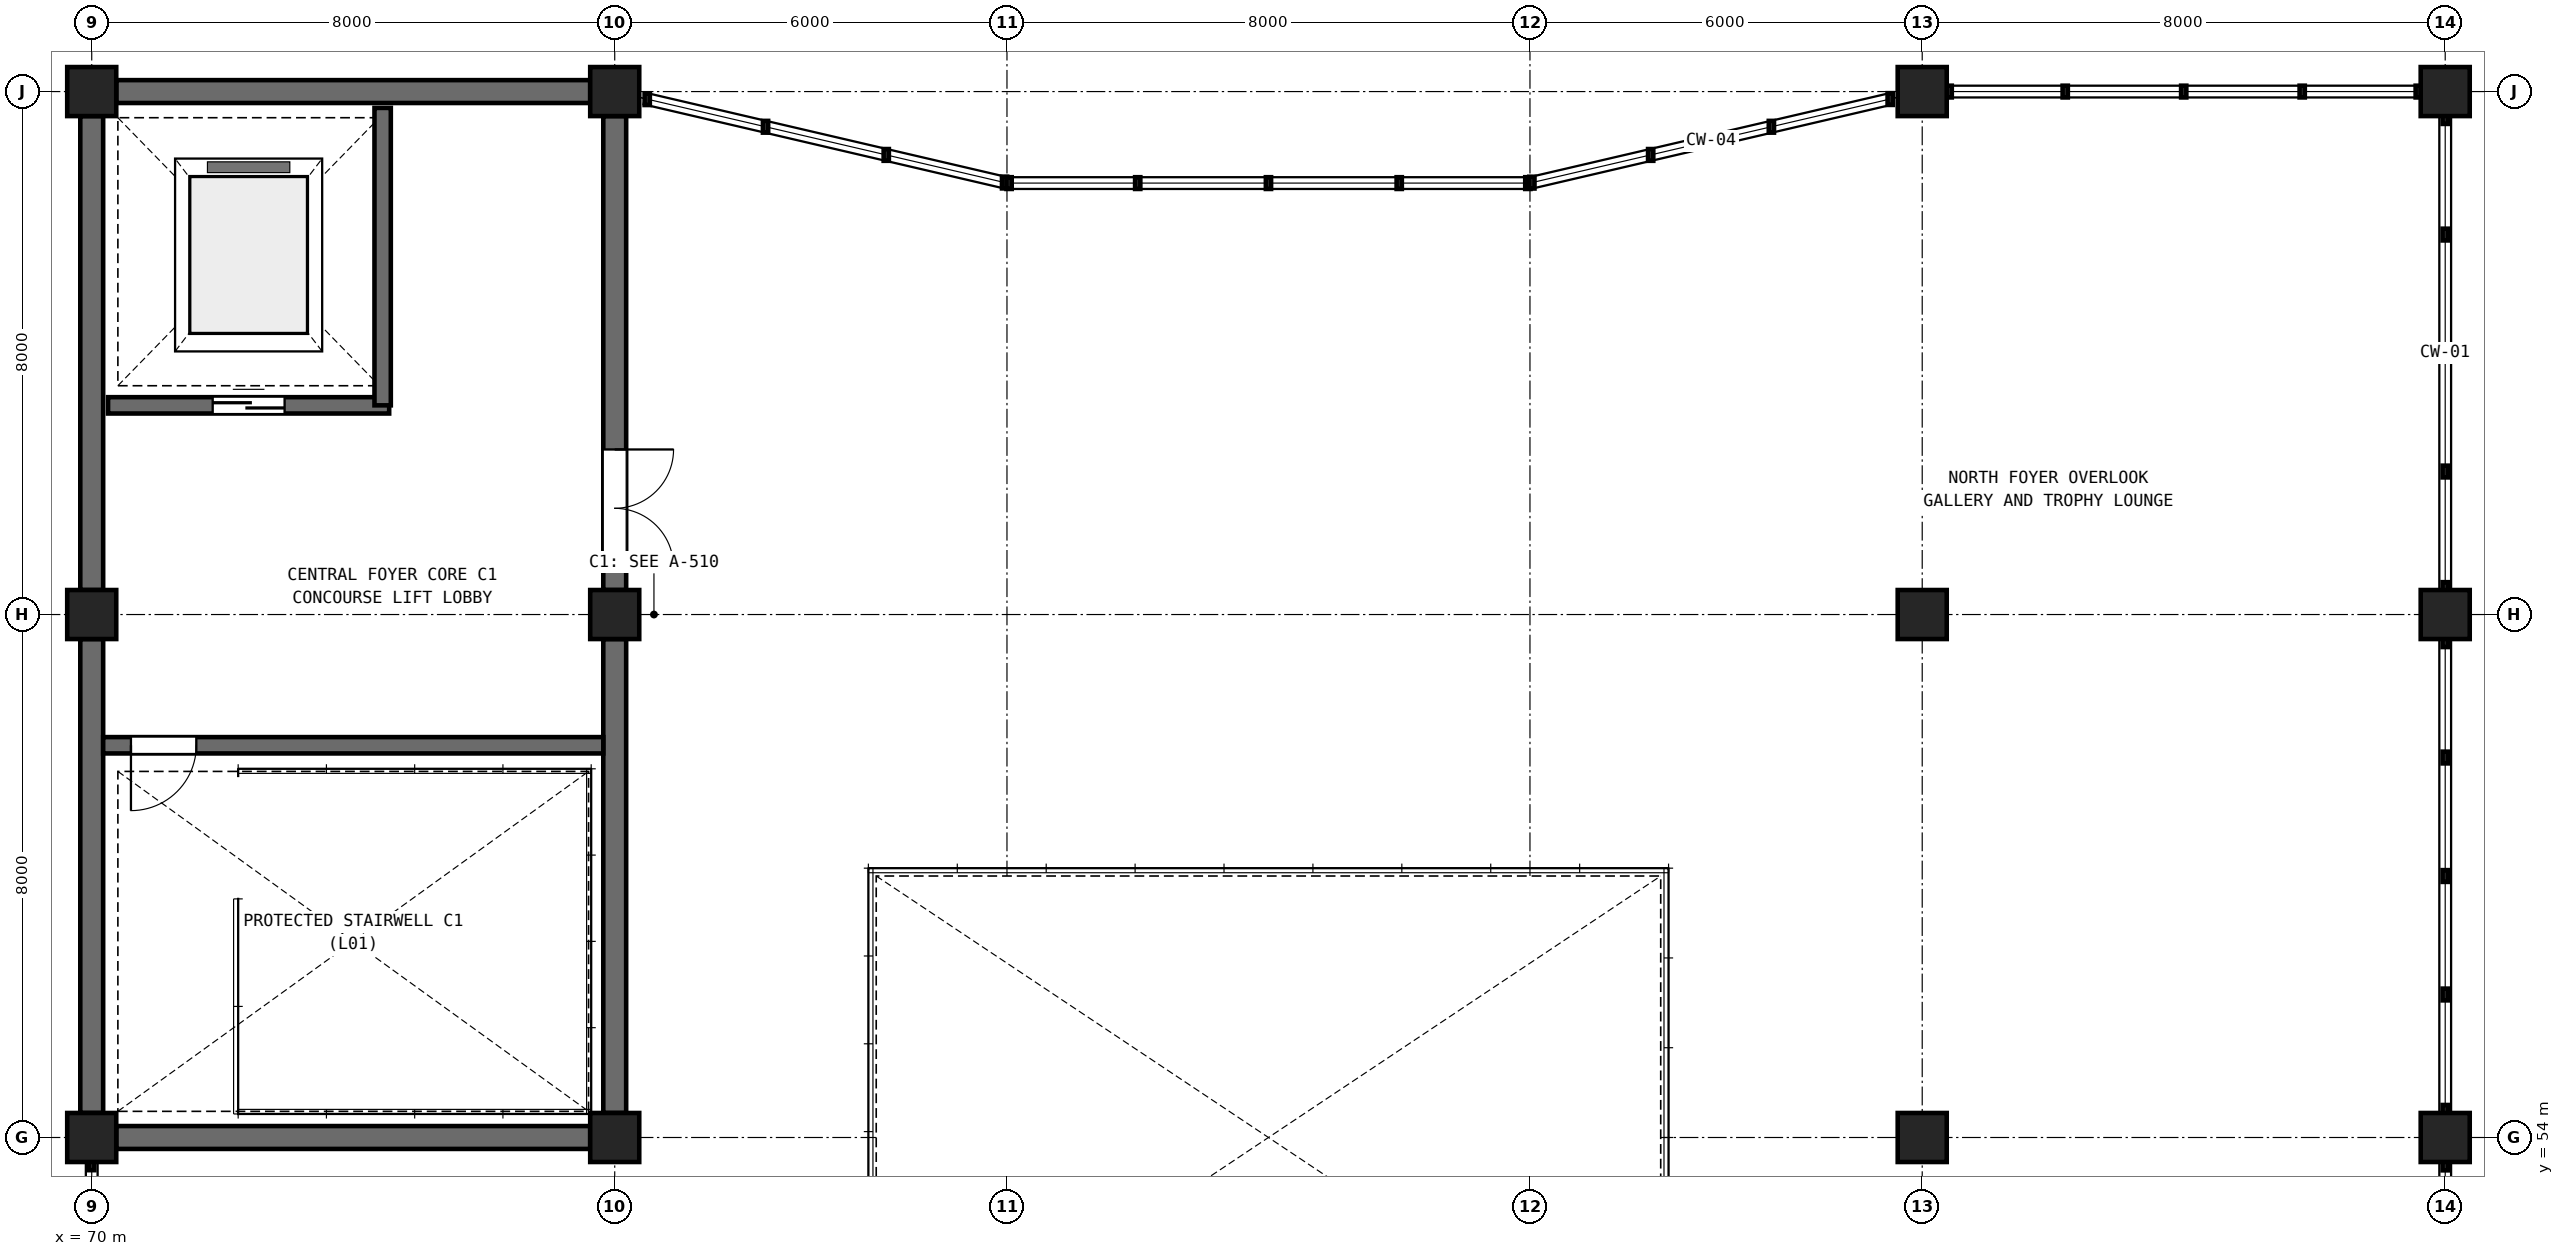
"""IFC4 building model, lengths in metres.
Left out: names, types, materials, properties, quantities, classifications, styles, units other than length and angle.
Written with IfcOpenShell. Run it as: python <this file> out.ifc"""

import sys

from ifc_helpers import new_model, si_unit, direction, frame, frame_2d, origin, origin_2d, place, context, subcontext, project, spatial, rectangle, circle, extrude, element, fill, save


model = new_model("IFC4")
c1 = context("Model", 3, precision=1e-05, world=origin(), true_north=direction((0.0, 1.0)))
c2 = subcontext(c1, "Body", "Model", "MODEL_VIEW")
j1 = project(units=[si_unit("LENGTHUNIT", "METRE"), si_unit("PLANEANGLEUNIT", "RADIAN")], contexts=[c1])
p1 = place(None, origin())
s1 = spatial("IfcSite", under=j1, at=p1, CompositionType="ELEMENT")
p2 = place(p1, origin())
s2 = spatial("IfcBuilding", under=s1, at=p2, CompositionType="ELEMENT")
p3 = place(p2, frame((0.0, 0.0, 5.4)))
s3 = spatial("IfcBuildingStorey", under=s2, at=p3, CompositionType="ELEMENT", Elevation=5.4)
for number, where, z_axis, x_axis in (
    (1, (70.0, 54.0, 0.0), (0.0, 0.0, 1.0), (1.0, 0.0, 0.0)),
    (2, (70.0, 62.0, 0.0), (0.0, 0.0, 1.0), (1.0, 0.0, 0.0)),
    (3, (70.0, 70.0, 0.0), (0.0, 0.0, 1.0), (1.0, 0.0, 0.0)),
    (4, (78.0, 54.0, 0.0), (0.0, 0.0, 1.0), (1.0, 0.0, 0.0)),
    (5, (78.0, 62.0, 0.0), (0.0, 0.0, 1.0), (1.0, 0.0, 0.0)),
    (6, (78.0, 70.0, 0.0), (0.0, 0.0, 1.0), (1.0, 0.0, 0.0)),
    (7, (98.0, 54.0, 0.0), (0.0, 0.0, 1.0), (1.0, 0.0, 0.0)),
    (8, (98.0, 62.0, 0.0), (0.0, 0.0, 1.0), (1.0, 0.0, 0.0)),
    (9, (98.0, 70.0, 0.0), (0.0, 0.0, 1.0), (1.0, 0.0, 0.0)),
    (10, (106.0, 54.0, 0.0), (0.0, 0.0, 1.0), (1.0, 0.0, 0.0)),
    (11, (106.0, 62.0, 0.0), (0.0, 0.0, 1.0), (1.0, 0.0, 0.0)),
    (12, (106.0, 70.0, 0.0), (0.0, 0.0, 1.0), (1.0, 0.0, 0.0)),
):
    element("IfcColumn", number, at=place(p3, frame(where, z_axis=z_axis, x_axis=x_axis)), inside=s3, PredefinedType="COLUMN", context=c2, shape_type="SweptSolid", body=[
        extrude(circle(Radius=0.375, at=origin_2d()), origin(), (0.0, 0.0, 1.0), 5.4),
    ])
for number, where, z_axis, x_axis in (
    (13, (70.375, 54.0, 0.0), (0.0, 0.0, 1.0), (1.0, 0.0, 0.0)),
    (14, (70.375, 70.0, 0.0), (0.0, 0.0, 1.0), (1.0, 0.0, 0.0)),
    (15, (70.0, 54.375, 0.0), (0.0, 0.0, 1.0), (0.0, 1.0, 0.0)),
    (16, (70.0, 62.375, 0.0), (0.0, 0.0, 1.0), (0.0, 1.0, 0.0)),
    (17, (78.0, 54.375, 0.0), (0.0, 0.0, 1.0), (0.0, 1.0, 0.0)),
):
    element("IfcWall", number, at=place(p3, frame(where, z_axis=z_axis, x_axis=x_axis)), inside=s3, PredefinedType="SHEAR", context=c2, shape_type="SweptSolid", body=[
        extrude(rectangle(XDim=7.25, YDim=0.35, at=frame_2d((3.625, 0.0))), origin(), (0.0, 0.0, 1.0), 5.18),
    ])
p4 = place(p3, frame((78.0, 62.375, 0.0), z_axis=(0.0, 0.0, 1.0), x_axis=(0.0, 1.0, 0.0)))
e18 = element("IfcWall", 18, at=p4, inside=s3, PredefinedType="SHEAR", context=c2, shape_type="SweptSolid", body=[
    extrude(rectangle(XDim=7.25, YDim=0.35, at=frame_2d((3.625, 0.0))), origin(), (0.0, 0.0, 1.0), 5.18),
])
p5 = place(p4, frame((0.35, 0.0, 0.0)))
e19 = element("IfcOpeningElement", 19, at=p5, cuts=e18, PredefinedType="OPENING", context=c2, shape_type="SweptSolid", body=[
    extrude(rectangle(XDim=1.8, YDim=2.2, at=frame_2d((0.9, 1.1))), frame((0.0, 0.185, 0.0), z_axis=(0.0, -1.0, 0.0), x_axis=(1.0, 0.0, 0.0)), (0.0, 0.0, 1.0), 0.37),
])
p6 = place(p3, frame((70.175, 60.0, 0.0), z_axis=(0.0, 0.0, 1.0), x_axis=(1.0, 0.0, 0.0)))
e20 = element("IfcWall", 20, at=p6, inside=s3, PredefinedType="SOLIDWALL", context=c2, shape_type="SweptSolid", body=[
    extrude(rectangle(XDim=7.65, YDim=0.25, at=frame_2d((3.825, 0.0))), origin(), (0.0, 0.0, 1.0), 5.18),
])
p7 = place(p6, frame((0.425, 0.0, 0.0)))
e21 = element("IfcOpeningElement", 21, at=p7, cuts=e20, PredefinedType="OPENING", context=c2, shape_type="SweptSolid", body=[
    extrude(rectangle(XDim=1.0, YDim=2.2, at=frame_2d((0.5, 1.1))), frame((0.0, 0.135, 0.0), z_axis=(0.0, -1.0, 0.0), x_axis=(1.0, 0.0, 0.0)), (0.0, 0.0, 1.0), 0.27),
])
p8 = place(p3, frame((70.25, 65.2, 0.0), z_axis=(0.0, 0.0, 1.0), x_axis=(1.0, 0.0, 0.0)))
e22 = element("IfcWall", 22, at=p8, inside=s3, PredefinedType="SOLIDWALL", context=c2, shape_type="SweptSolid", body=[
    extrude(rectangle(XDim=4.3, YDim=0.25, at=frame_2d((2.15, 0.0))), origin(), (0.0, 0.0, 1.0), 5.18),
])
p9 = place(p8, frame((1.6, 0.0, 0.0)))
e23 = element("IfcOpeningElement", 23, at=p9, cuts=e22, PredefinedType="OPENING", context=c2, shape_type="SweptSolid", body=[
    extrude(rectangle(XDim=1.1, YDim=2.2, at=frame_2d((0.55, 1.1))), frame((0.0, 0.135, 0.0), z_axis=(0.0, -1.0, 0.0), x_axis=(1.0, 0.0, 0.0)), (0.0, 0.0, 1.0), 0.27),
])
p10 = place(p3, frame((74.45, 65.2, 0.0), z_axis=(0.0, 0.0, 1.0), x_axis=(0.0, 1.0, 0.0)))
e24 = element("IfcWall", 24, at=p10, inside=s3, PredefinedType="SOLIDWALL", context=c2, shape_type="SweptSolid", body=[
    extrude(rectangle(XDim=4.55, YDim=0.25, at=frame_2d((2.275, 0.0))), origin(), (0.0, 0.0, 1.0), 5.18),
])
p11 = place(p5, frame((1.8, 0.0, 0.0), z_axis=(0.0, 0.0, 1.0), x_axis=(-1.0, 0.0, 0.0)))
e25 = element("IfcDoor", 25, at=p11, inside=s3, OperationType="DOUBLE_DOOR_SINGLE_SWING", PredefinedType="DOOR", context=c2, shape_type="SweptSolid", body=[
    extrude(rectangle(XDim=1.8, YDim=2.2, at=frame_2d((0.9, 1.1))), frame((0.0, 0.025, 0.0), z_axis=(0.0, -1.0, 0.0), x_axis=(1.0, 0.0, 0.0)), (0.0, 0.0, 1.0), 0.05),
])
fill(e19, e25)
p12 = place(p7, frame((1.0, 0.0, 0.0), z_axis=(0.0, 0.0, 1.0), x_axis=(-1.0, 0.0, 0.0)))
e26 = element("IfcDoor", 26, at=p12, inside=s3, OperationType="SINGLE_SWING_LEFT", PredefinedType="DOOR", context=c2, shape_type="SweptSolid", body=[
    extrude(rectangle(XDim=1.0, YDim=2.2, at=frame_2d((0.5, 1.1))), frame((0.0, 0.025, 0.0), z_axis=(0.0, -1.0, 0.0), x_axis=(1.0, 0.0, 0.0)), (0.0, 0.0, 1.0), 0.05),
])
fill(e21, e26)
p13 = place(p9, origin())
e27 = element("IfcDoor", 27, at=p13, inside=s3, OperationType="DOUBLE_DOOR_SLIDING", PredefinedType="DOOR", context=c2, shape_type="SweptSolid", body=[
    extrude(rectangle(XDim=1.1, YDim=2.2, at=frame_2d((0.55, 1.1))), frame((0.0, 0.025, 0.0), z_axis=(0.0, -1.0, 0.0), x_axis=(1.0, 0.0, 0.0)), (0.0, 0.0, 1.0), 0.05),
])
fill(e23, e27)
save(model, sys.argv[1])
